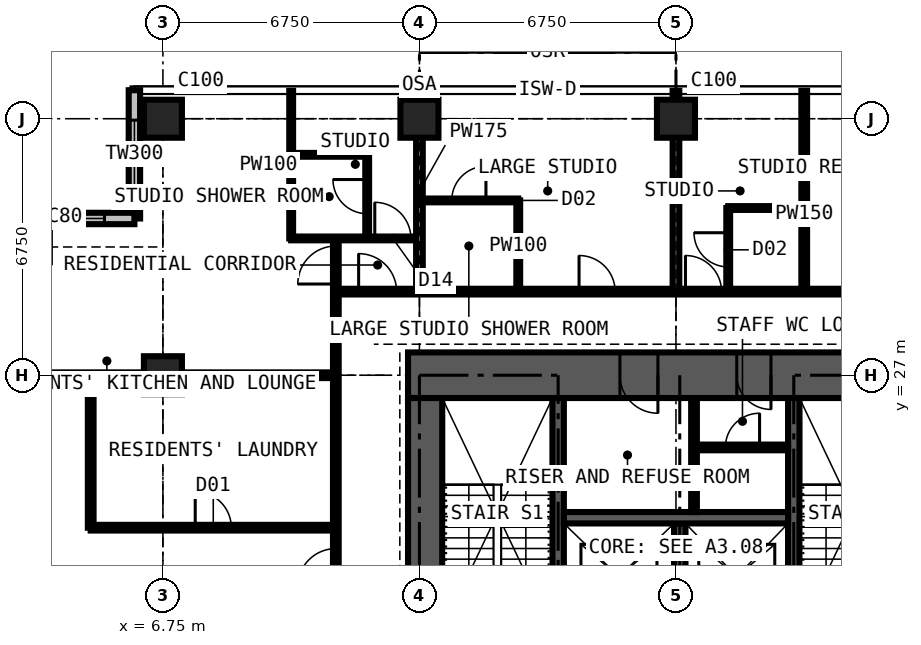
"""IFC4 building model, lengths in metres.
Left out: names, types, materials, properties, quantities, classifications, styles, units other than length and angle.
Written with IfcOpenShell. Run it as: python <this file> out.ifc"""

import sys

from ifc_helpers import new_model, si_unit, direction, frame, frame_2d, origin, origin_2d, place, context, subcontext, project, spatial, rectangle, extrude, element, fill, save


model = new_model("IFC4")
c1 = context("Model", 3, precision=1e-05, world=origin(), true_north=direction((0.0, 1.0)))
c2 = subcontext(c1, "Body", "Model", "MODEL_VIEW")
j1 = project(units=[si_unit("LENGTHUNIT", "METRE"), si_unit("PLANEANGLEUNIT", "RADIAN")], contexts=[c1])
p1 = place(None, origin())
s1 = spatial("IfcSite", under=j1, at=p1, CompositionType="ELEMENT")
p2 = place(p1, origin())
s2 = spatial("IfcBuilding", under=s1, at=p2, CompositionType="ELEMENT")
p3 = place(p2, frame((0.0, 0.0, 243.9)))
s3 = spatial("IfcBuildingStorey", under=s2, at=p3, CompositionType="ELEMENT", Elevation=243.9)
for number, where, z_axis, x_axis in (
    (1, (6.75, 27.0, 0.0), (0.0, 0.0, 1.0), (1.0, 0.0, 0.0)),
    (2, (6.75, 33.75, 0.0), (0.0, 0.0, 1.0), (1.0, 0.0, 0.0)),
    (3, (13.5, 33.75, 0.0), (0.0, 0.0, 1.0), (1.0, 0.0, 0.0)),
    (4, (20.25, 33.75, 0.0), (0.0, 0.0, 1.0), (1.0, 0.0, 0.0)),
):
    element("IfcColumn", number, at=place(p3, frame(where, z_axis=z_axis, x_axis=x_axis)), inside=s3, PredefinedType="COLUMN", context=c2, shape_type="SweptSolid", body=[
        extrude(rectangle(XDim=1.0, YDim=1.0, at=origin_2d()), origin(), (0.0, 0.0, 1.0), 3.6),
    ])
p4 = place(p3, frame((27.3, 27.0, 0.0), z_axis=(0.0, 0.0, 1.0), x_axis=(-1.0, 0.0, 0.0)))
e5 = element("IfcWall", 5, at=p4, inside=s3, PredefinedType="SHEAR", context=c2, shape_type="SweptSolid", body=[
    extrude(rectangle(XDim=14.1, YDim=1.2, at=frame_2d((7.05, 0.0))), origin(), (0.0, 0.0, 1.0), 3.6),
])
p5 = place(p4, frame((4.55, 0.0, 0.0)))
e6 = element("IfcOpeningElement", 6, at=p5, cuts=e5, PredefinedType="OPENING", context=c2, shape_type="SweptSolid", body=[
    extrude(rectangle(XDim=0.9, YDim=2.2, at=frame_2d((0.45, 1.1))), frame((0.0, 0.61, 0.0), z_axis=(0.0, -1.0, 0.0), x_axis=(1.0, 0.0, 0.0)), (0.0, 0.0, 1.0), 1.22),
])
p6 = place(p4, frame((7.525, 0.0, 0.0)))
e7 = element("IfcOpeningElement", 7, at=p6, cuts=e5, PredefinedType="OPENING", context=c2, shape_type="SweptSolid", body=[
    extrude(rectangle(XDim=1.0, YDim=2.2, at=frame_2d((0.5, 1.1))), frame((0.0, 0.61, 0.0), z_axis=(0.0, -1.0, 0.0), x_axis=(1.0, 0.0, 0.0)), (0.0, 0.0, 1.0), 1.22),
])
p7 = place(p3, frame((13.65, 26.4, 0.0), z_axis=(0.0, 0.0, 1.0), x_axis=(0.0, -1.0, 0.0)))
e8 = element("IfcWall", 8, at=p7, inside=s3, PredefinedType="SHEAR", context=c2, shape_type="SweptSolid", body=[
    extrude(rectangle(XDim=12.3, YDim=0.9, at=frame_2d((6.15, 0.0))), origin(), (0.0, 0.0, 1.0), 3.6),
])
p8 = place(p7, frame((7.45, 0.0, 0.0)))
e9 = element("IfcOpeningElement", 9, at=p8, cuts=e8, PredefinedType="OPENING", context=c2, shape_type="SweptSolid", body=[
    extrude(rectangle(XDim=1.2, YDim=2.2, at=frame_2d((0.6, 1.1))), frame((0.0, 0.46, 0.0), z_axis=(0.0, -1.0, 0.0), x_axis=(1.0, 0.0, 0.0)), (0.0, 0.0, 1.0), 0.92),
])
p9 = place(p3, frame((6.0, 34.5, 0.0), z_axis=(0.0, 0.0, 1.0), x_axis=(0.0, -1.0, 0.0)))
e10 = element("IfcWall", 10, at=p9, inside=s3, PredefinedType="SOLIDWALL", context=c2, shape_type="SweptSolid", body=[
    extrude(rectangle(XDim=3.375, YDim=0.3, at=frame_2d((1.688, 0.0))), origin(), (0.0, 0.0, 1.0), 3.375),
])
p10 = place(p9, frame((0.788, 0.0, 0.6)))
e11 = element("IfcOpeningElement", 11, at=p10, cuts=e10, PredefinedType="OPENING", context=c2, shape_type="SweptSolid", body=[
    extrude(rectangle(XDim=1.8, YDim=2.1, at=frame_2d((0.9, 1.05))), frame((0.0, 0.16, 0.0), z_axis=(0.0, -1.0, 0.0), x_axis=(1.0, 0.0, 0.0)), (0.0, 0.0, 1.0), 0.32),
])
p11 = place(p3, frame((6.0, 31.125, 0.0), z_axis=(0.0, 0.0, 1.0), x_axis=(-1.0, 0.0, 0.0)))
e12 = element("IfcWall", 12, at=p11, inside=s3, PredefinedType="SOLIDWALL", context=c2, shape_type="SweptSolid", body=[
    extrude(rectangle(XDim=3.375, YDim=0.3, at=frame_2d((1.688, 0.0))), origin(), (0.0, 0.0, 1.0), 3.375),
])
p12 = place(p11, frame((0.788, 0.0, 0.6)))
e13 = element("IfcOpeningElement", 13, at=p12, cuts=e12, PredefinedType="OPENING", context=c2, shape_type="SweptSolid", body=[
    extrude(rectangle(XDim=1.8, YDim=2.1, at=frame_2d((0.9, 1.05))), frame((0.0, 0.16, 0.0), z_axis=(0.0, -1.0, 0.0), x_axis=(1.0, 0.0, 0.0)), (0.0, 0.0, 1.0), 0.32),
])
for number, where, z_axis, x_axis in (
    (14, (17.15, 20.3, 0.0), (0.0, 0.0, 1.0), (0.0, 1.0, 0.0)),
    (15, (23.35, 20.3, 0.0), (0.0, 0.0, 1.0), (0.0, 1.0, 0.0)),
):
    element("IfcWall", number, at=place(p3, frame(where, z_axis=z_axis, x_axis=x_axis)), inside=s3, PredefinedType="SHEAR", context=c2, shape_type="SweptSolid", body=[
        extrude(rectangle(XDim=6.1, YDim=0.3, at=frame_2d((3.05, 0.0))), origin(), (0.0, 0.0, 1.0), 3.6),
    ])
p13 = place(p3, frame((20.35, 20.3, 0.0), z_axis=(0.0, 0.0, 1.0), x_axis=(0.0, 1.0, 0.0)))
e16 = element("IfcWall", 16, at=p13, inside=s3, PredefinedType="SHEAR", context=c2, shape_type="SweptSolid", body=[
    extrude(rectangle(XDim=2.8, YDim=0.3, at=frame_2d((1.4, 0.0))), origin(), (0.0, 0.0, 1.0), 3.6),
])
p14 = place(p3, frame((17.3, 23.25, 0.0), z_axis=(0.0, 0.0, 1.0), x_axis=(1.0, 0.0, 0.0)))
e17 = element("IfcWall", 17, at=p14, inside=s3, PredefinedType="SHEAR", context=c2, shape_type="SweptSolid", body=[
    extrude(rectangle(XDim=5.9, YDim=0.3, at=frame_2d((2.95, 0.0))), origin(), (0.0, 0.0, 1.0), 3.6),
])
p15 = place(p3, frame((20.725, 23.4, 0.0), z_axis=(0.0, 0.0, 1.0), x_axis=(0.0, 1.0, 0.0)))
e18 = element("IfcWall", 18, at=p15, inside=s3, PredefinedType="PARTITIONING", context=c2, shape_type="SweptSolid", body=[
    extrude(rectangle(XDim=3.0, YDim=0.15, at=frame_2d((1.5, 0.0))), origin(), (0.0, 0.0, 1.0), 3.375),
])
p16 = place(p3, frame((20.8, 25.1, 0.0), z_axis=(0.0, 0.0, 1.0), x_axis=(1.0, 0.0, 0.0)))
e19 = element("IfcWall", 19, at=p16, inside=s3, PredefinedType="PARTITIONING", context=c2, shape_type="SweptSolid", body=[
    extrude(rectangle(XDim=2.4, YDim=0.15, at=frame_2d((1.2, 0.0))), origin(), (0.0, 0.0, 1.0), 3.375),
])
p17 = place(p16, frame((0.75, 0.0, 0.0)))
e20 = element("IfcOpeningElement", 20, at=p17, cuts=e19, PredefinedType="OPENING", context=c2, shape_type="SweptSolid", body=[
    extrude(rectangle(XDim=0.9, YDim=2.2, at=frame_2d((0.45, 1.1))), frame((0.0, 0.085, 0.0), z_axis=(0.0, -1.0, 0.0), x_axis=(1.0, 0.0, 0.0)), (0.0, 0.0, 1.0), 0.17),
])
p18 = place(p3, frame((3.35, 27.0, 0.0), z_axis=(0.0, 0.0, 1.0), x_axis=(1.0, 0.0, 0.0)))
e21 = element("IfcWall", 21, at=p18, inside=s3, PredefinedType="PARTITIONING", context=c2, shape_type="SweptSolid", body=[
    extrude(rectangle(XDim=7.95, YDim=0.15, at=frame_2d((3.975, 0.0))), origin(), (0.0, 0.0, 1.0), 2.877),
])
p19 = place(p3, frame((4.85, 22.988, 0.0), z_axis=(0.0, 0.0, 1.0), x_axis=(0.0, 1.0, 0.0)))
e22 = element("IfcWall", 22, at=p19, inside=s3, PredefinedType="PARTITIONING", context=c2, shape_type="SweptSolid", body=[
    extrude(rectangle(XDim=4.012, YDim=0.15, at=frame_2d((2.006, 0.0))), origin(), (0.0, 0.0, 1.0), 3.375),
])
p20 = place(p3, frame((4.85, 22.988, 0.0), z_axis=(0.0, 0.0, 1.0), x_axis=(1.0, 0.0, 0.0)))
e23 = element("IfcWall", 23, at=p20, inside=s3, PredefinedType="PARTITIONING", context=c2, shape_type="SweptSolid", body=[
    extrude(rectangle(XDim=6.45, YDim=0.15, at=frame_2d((3.225, 0.0))), origin(), (0.0, 0.0, 1.0), 3.375),
])
p21 = place(p20, frame((2.75, 0.0, 0.0)))
e24 = element("IfcOpeningElement", 24, at=p21, cuts=e23, PredefinedType="OPENING", context=c2, shape_type="SweptSolid", body=[
    extrude(rectangle(XDim=0.95, YDim=2.2, at=frame_2d((0.475, 1.1))), frame((0.0, 0.085, 0.0), z_axis=(0.0, -1.0, 0.0), x_axis=(1.0, 0.0, 0.0)), (0.0, 0.0, 1.0), 0.17),
])
p22 = place(p3, frame((10.125, 30.6, 0.0), z_axis=(0.0, 0.0, 1.0), x_axis=(0.0, 1.0, 0.0)))
e25 = element("IfcWall", 25, at=p22, inside=s3, PredefinedType="PARTITIONING", context=c2, shape_type="SweptSolid", body=[
    extrude(rectangle(XDim=3.884, YDim=0.1, at=frame_2d((1.942, 0.0))), origin(), (0.0, 0.0, 1.0), 3.375),
])
p23 = place(p3, frame((10.125, 30.6, 0.0), z_axis=(0.0, 0.0, 1.0), x_axis=(1.0, 0.0, 0.0)))
e26 = element("IfcWall", 26, at=p23, inside=s3, PredefinedType="PARTITIONING", context=c2, shape_type="SweptSolid", body=[
    extrude(rectangle(XDim=3.375, YDim=0.1, at=frame_2d((1.688, 0.0))), origin(), (0.0, 0.0, 1.0), 3.375),
])
p24 = place(p23, frame((2.2, 0.0, 0.0)))
e27 = element("IfcOpeningElement", 27, at=p24, cuts=e26, PredefinedType="OPENING", context=c2, shape_type="SweptSolid", body=[
    extrude(rectangle(XDim=0.95, YDim=2.2, at=frame_2d((0.475, 1.1))), frame((0.0, 0.06, 0.0), z_axis=(0.0, -1.0, 0.0), x_axis=(1.0, 0.0, 0.0)), (0.0, 0.0, 1.0), 0.12),
])
p25 = place(p3, frame((10.125, 32.8, 0.0), z_axis=(0.0, 0.0, 1.0), x_axis=(1.0, 0.0, 0.0)))
e28 = element("IfcWall", 28, at=p25, inside=s3, PredefinedType="PARTITIONING", context=c2, shape_type="SweptSolid", body=[
    extrude(rectangle(XDim=2.0, YDim=0.1, at=frame_2d((1.0, 0.0))), origin(), (0.0, 0.0, 1.0), 3.375),
])
p26 = place(p3, frame((11.3, 11.3, 0.0), z_axis=(0.0, 0.0, 1.0), x_axis=(0.0, 1.0, 0.0)))
e29 = element("IfcWall", 29, at=p26, inside=s3, PredefinedType="PARTITIONING", context=c2, shape_type="SweptSolid", body=[
    extrude(rectangle(XDim=19.3, YDim=0.15, at=frame_2d((9.65, 0.0))), origin(), (0.0, 0.0, 1.0), 3.375),
])
p27 = place(p26, frame((18.1, 0.0, 0.0)))
e30 = element("IfcOpeningElement", 30, at=p27, cuts=e29, PredefinedType="OPENING", context=c2, shape_type="SweptSolid", body=[
    extrude(rectangle(XDim=1.0, YDim=2.2, at=frame_2d((0.5, 1.1))), frame((0.0, 0.085, 0.0), z_axis=(0.0, -1.0, 0.0), x_axis=(1.0, 0.0, 0.0)), (0.0, 0.0, 1.0), 0.17),
])
p28 = place(p26, frame((10.137, 0.0, 0.0)))
e31 = element("IfcOpeningElement", 31, at=p28, cuts=e29, PredefinedType="OPENING", context=c2, shape_type="SweptSolid", body=[
    extrude(rectangle(XDim=1.0, YDim=2.2, at=frame_2d((0.5, 1.1))), frame((0.0, 0.085, 0.0), z_axis=(0.0, -1.0, 0.0), x_axis=(1.0, 0.0, 0.0)), (0.0, 0.0, 1.0), 0.17),
])
p29 = place(p3, frame((11.3, 29.2, 0.0), z_axis=(0.0, 0.0, 1.0), x_axis=(1.0, 0.0, 0.0)))
e32 = element("IfcWall", 32, at=p29, inside=s3, PredefinedType="PARTITIONING", context=c2, shape_type="SweptSolid", body=[
    extrude(rectangle(XDim=19.809, YDim=0.15, at=frame_2d((9.904, 0.0))), origin(), (0.0, 0.0, 1.0), 3.375),
])
p30 = place(p29, frame((14.625, 0.0, 0.0)))
e33 = element("IfcOpeningElement", 33, at=p30, cuts=e32, PredefinedType="OPENING", context=c2, shape_type="SweptSolid", body=[
    extrude(rectangle(XDim=1.0, YDim=2.2, at=frame_2d((0.5, 1.1))), frame((0.0, 0.085, 0.0), z_axis=(0.0, -1.0, 0.0), x_axis=(1.0, 0.0, 0.0)), (0.0, 0.0, 1.0), 0.17),
])
p31 = place(p29, frame((6.4, 0.0, 0.0)))
e34 = element("IfcOpeningElement", 34, at=p31, cuts=e32, PredefinedType="OPENING", context=c2, shape_type="SweptSolid", body=[
    extrude(rectangle(XDim=0.95, YDim=2.2, at=frame_2d((0.475, 1.1))), frame((0.0, 0.085, 0.0), z_axis=(0.0, -1.0, 0.0), x_axis=(1.0, 0.0, 0.0)), (0.0, 0.0, 1.0), 0.17),
])
p32 = place(p29, frame((9.2, 0.0, 0.0)))
e35 = element("IfcOpeningElement", 35, at=p32, cuts=e32, PredefinedType="OPENING", context=c2, shape_type="SweptSolid", body=[
    extrude(rectangle(XDim=0.95, YDim=2.2, at=frame_2d((0.475, 1.1))), frame((0.0, 0.085, 0.0), z_axis=(0.0, -1.0, 0.0), x_axis=(1.0, 0.0, 0.0)), (0.0, 0.0, 1.0), 0.17),
])
p33 = place(p29, frame((0.6, 0.0, 0.0)))
e36 = element("IfcOpeningElement", 36, at=p33, cuts=e32, PredefinedType="OPENING", context=c2, shape_type="SweptSolid", body=[
    extrude(rectangle(XDim=1.0, YDim=2.2, at=frame_2d((0.5, 1.1))), frame((0.0, 0.085, 0.0), z_axis=(0.0, -1.0, 0.0), x_axis=(1.0, 0.0, 0.0)), (0.0, 0.0, 1.0), 0.17),
])
p34 = place(p3, frame((12.125, 30.6, 0.0), z_axis=(0.0, 0.0, 1.0), x_axis=(0.0, 1.0, 0.0)))
e37 = element("IfcWall", 37, at=p34, inside=s3, PredefinedType="PARTITIONING", context=c2, shape_type="SweptSolid", body=[
    extrude(rectangle(XDim=2.2, YDim=0.1, at=frame_2d((1.1, 0.0))), origin(), (0.0, 0.0, 1.0), 3.375),
])
p35 = place(p34, frame((0.65, 0.0, 0.0)))
e38 = element("IfcOpeningElement", 38, at=p35, cuts=e37, PredefinedType="OPENING", context=c2, shape_type="SweptSolid", body=[
    extrude(rectangle(XDim=0.9, YDim=2.2, at=frame_2d((0.45, 1.1))), frame((0.0, 0.06, 0.0), z_axis=(0.0, -1.0, 0.0), x_axis=(1.0, 0.0, 0.0)), (0.0, 0.0, 1.0), 0.12),
])
p36 = place(p3, frame((13.5, 29.2, 0.0), z_axis=(0.0, 0.0, 1.0), x_axis=(0.0, 1.0, 0.0)))
e39 = element("IfcWall", 39, at=p36, inside=s3, PredefinedType="PARTITIONING", context=c2, shape_type="SweptSolid", body=[
    extrude(rectangle(XDim=5.284, YDim=0.175, at=frame_2d((2.642, 0.0))), origin(), (0.0, 0.0, 1.0), 2.61),
])
p37 = place(p3, frame((13.5, 31.6, 0.0), z_axis=(0.0, 0.0, 1.0), x_axis=(1.0, 0.0, 0.0)))
e40 = element("IfcWall", 40, at=p37, inside=s3, PredefinedType="PARTITIONING", context=c2, shape_type="SweptSolid", body=[
    extrude(rectangle(XDim=2.6, YDim=0.1, at=frame_2d((1.3, 0.0))), origin(), (0.0, 0.0, 1.0), 3.375),
])
p38 = place(p37, frame((0.85, 0.0, 0.0)))
e41 = element("IfcOpeningElement", 41, at=p38, cuts=e40, PredefinedType="OPENING", context=c2, shape_type="SweptSolid", body=[
    extrude(rectangle(XDim=0.9, YDim=2.2, at=frame_2d((0.45, 1.1))), frame((0.0, 0.06, 0.0), z_axis=(0.0, -1.0, 0.0), x_axis=(1.0, 0.0, 0.0)), (0.0, 0.0, 1.0), 0.12),
])
p39 = place(p3, frame((16.1, 29.2, 0.0), z_axis=(0.0, 0.0, 1.0), x_axis=(0.0, 1.0, 0.0)))
e42 = element("IfcWall", 42, at=p39, inside=s3, PredefinedType="PARTITIONING", context=c2, shape_type="SweptSolid", body=[
    extrude(rectangle(XDim=2.4, YDim=0.1, at=frame_2d((1.2, 0.0))), origin(), (0.0, 0.0, 1.0), 3.375),
])
p40 = place(p3, frame((20.25, 29.2, 0.0), z_axis=(0.0, 0.0, 1.0), x_axis=(0.0, 1.0, 0.0)))
e43 = element("IfcWall", 43, at=p40, inside=s3, PredefinedType="PARTITIONING", context=c2, shape_type="SweptSolid", body=[
    extrude(rectangle(XDim=5.284, YDim=0.175, at=frame_2d((2.642, 0.0))), origin(), (0.0, 0.0, 1.0), 2.61),
])
p41 = place(p3, frame((21.625, 29.2, 0.0), z_axis=(0.0, 0.0, 1.0), x_axis=(0.0, 1.0, 0.0)))
e44 = element("IfcWall", 44, at=p41, inside=s3, PredefinedType="PARTITIONING", context=c2, shape_type="SweptSolid", body=[
    extrude(rectangle(XDim=2.2, YDim=0.1, at=frame_2d((1.1, 0.0))), origin(), (0.0, 0.0, 1.0), 3.375),
])
p42 = place(p41, frame((0.65, 0.0, 0.0)))
e45 = element("IfcOpeningElement", 45, at=p42, cuts=e44, PredefinedType="OPENING", context=c2, shape_type="SweptSolid", body=[
    extrude(rectangle(XDim=0.9, YDim=2.2, at=frame_2d((0.45, 1.1))), frame((0.0, 0.06, 0.0), z_axis=(0.0, -1.0, 0.0), x_axis=(1.0, 0.0, 0.0)), (0.0, 0.0, 1.0), 0.12),
])
p43 = place(p3, frame((21.625, 31.4, 0.0), z_axis=(0.0, 0.0, 1.0), x_axis=(1.0, 0.0, 0.0)))
e46 = element("IfcWall", 46, at=p43, inside=s3, PredefinedType="PARTITIONING", context=c2, shape_type="SweptSolid", body=[
    extrude(rectangle(XDim=2.0, YDim=0.1, at=frame_2d((1.0, 0.0))), origin(), (0.0, 0.0, 1.0), 3.375),
])
p44 = place(p3, frame((23.625, 29.2, 0.0), z_axis=(0.0, 0.0, 1.0), x_axis=(0.0, 1.0, 0.0)))
e47 = element("IfcWall", 47, at=p44, inside=s3, PredefinedType="PARTITIONING", context=c2, shape_type="SweptSolid", body=[
    extrude(rectangle(XDim=5.284, YDim=0.15, at=frame_2d((2.642, 0.0))), origin(), (0.0, 0.0, 1.0), 3.375),
])
p45 = place(p10, origin())
e48 = element("IfcWindow", 48, at=p45, inside=s3, PartitioningType="SINGLE_PANEL", PredefinedType="WINDOW", context=c2, shape_type="SweptSolid", body=[
    extrude(rectangle(XDim=1.8, YDim=2.1, at=frame_2d((0.9, 1.05))), frame((0.0, 0.03, 0.0), z_axis=(0.0, -1.0, 0.0), x_axis=(1.0, 0.0, 0.0)), (0.0, 0.0, 1.0), 0.06),
])
fill(e11, e48)
p46 = place(p12, origin())
e49 = element("IfcWindow", 49, at=p46, inside=s3, PartitioningType="SINGLE_PANEL", PredefinedType="WINDOW", context=c2, shape_type="SweptSolid", body=[
    extrude(rectangle(XDim=1.8, YDim=2.1, at=frame_2d((0.9, 1.05))), frame((0.0, 0.03, 0.0), z_axis=(0.0, -1.0, 0.0), x_axis=(1.0, 0.0, 0.0)), (0.0, 0.0, 1.0), 0.06),
])
fill(e13, e49)
p47 = place(p17, origin())
e50 = element("IfcDoor", 50, at=p47, inside=s3, OperationType="SINGLE_SWING_RIGHT", PredefinedType="DOOR", context=c2, shape_type="SweptSolid", body=[
    extrude(rectangle(XDim=0.9, YDim=2.2, at=frame_2d((0.45, 1.1))), frame((0.0, 0.025, 0.0), z_axis=(0.0, -1.0, 0.0), x_axis=(1.0, 0.0, 0.0)), (0.0, 0.0, 1.0), 0.05),
])
fill(e20, e50)
p48 = place(p5, origin())
e51 = element("IfcDoor", 51, at=p48, inside=s3, OperationType="SINGLE_SWING_LEFT", PredefinedType="DOOR", context=c2, shape_type="SweptSolid", body=[
    extrude(rectangle(XDim=0.9, YDim=2.2, at=frame_2d((0.45, 1.1))), frame((0.0, 0.4, 0.0), z_axis=(0.0, -1.0, 0.0), x_axis=(1.0, 0.0, 0.0)), (0.0, 0.0, 1.0), 0.8),
])
fill(e6, e51)
p49 = place(p6, origin())
e52 = element("IfcDoor", 52, at=p49, inside=s3, OperationType="SINGLE_SWING_LEFT", PredefinedType="DOOR", context=c2, shape_type="SweptSolid", body=[
    extrude(rectangle(XDim=1.0, YDim=2.2, at=frame_2d((0.5, 1.1))), frame((0.0, 0.025, 0.0), z_axis=(0.0, -1.0, 0.0), x_axis=(1.0, 0.0, 0.0)), (0.0, 0.0, 1.0), 0.05),
])
fill(e7, e52)
p50 = place(p31, origin())
e53 = element("IfcDoor", 53, at=p50, inside=s3, OperationType="SINGLE_SWING_LEFT", PredefinedType="DOOR", context=c2, shape_type="SweptSolid", body=[
    extrude(rectangle(XDim=0.95, YDim=2.2, at=frame_2d((0.475, 1.1))), frame((0.0, 0.025, 0.0), z_axis=(0.0, -1.0, 0.0), x_axis=(1.0, 0.0, 0.0)), (0.0, 0.0, 1.0), 0.05),
])
fill(e34, e53)
p51 = place(p38, origin())
e54 = element("IfcDoor", 54, at=p51, inside=s3, OperationType="SINGLE_SWING_RIGHT", PredefinedType="DOOR", context=c2, shape_type="SweptSolid", body=[
    extrude(rectangle(XDim=0.9, YDim=2.2, at=frame_2d((0.45, 1.1))), frame((0.0, 0.025, 0.0), z_axis=(0.0, -1.0, 0.0), x_axis=(1.0, 0.0, 0.0)), (0.0, 0.0, 1.0), 0.05),
])
fill(e41, e54)
p52 = place(p24, origin())
e55 = element("IfcDoor", 55, at=p52, inside=s3, OperationType="SINGLE_SWING_LEFT", PredefinedType="DOOR", context=c2, shape_type="SweptSolid", body=[
    extrude(rectangle(XDim=0.95, YDim=2.2, at=frame_2d((0.475, 1.1))), frame((0.0, 0.025, 0.0), z_axis=(0.0, -1.0, 0.0), x_axis=(1.0, 0.0, 0.0)), (0.0, 0.0, 1.0), 0.05),
])
fill(e27, e55)
p53 = place(p35, origin())
e56 = element("IfcDoor", 56, at=p53, inside=s3, OperationType="SINGLE_SWING_RIGHT", PredefinedType="DOOR", context=c2, shape_type="SweptSolid", body=[
    extrude(rectangle(XDim=0.9, YDim=2.2, at=frame_2d((0.45, 1.1))), frame((0.0, 0.025, 0.0), z_axis=(0.0, -1.0, 0.0), x_axis=(1.0, 0.0, 0.0)), (0.0, 0.0, 1.0), 0.05),
])
fill(e38, e56)
p54 = place(p32, origin())
e57 = element("IfcDoor", 57, at=p54, inside=s3, OperationType="SINGLE_SWING_LEFT", PredefinedType="DOOR", context=c2, shape_type="SweptSolid", body=[
    extrude(rectangle(XDim=0.95, YDim=2.2, at=frame_2d((0.475, 1.1))), frame((0.0, 0.025, 0.0), z_axis=(0.0, -1.0, 0.0), x_axis=(1.0, 0.0, 0.0)), (0.0, 0.0, 1.0), 0.05),
])
fill(e35, e57)
p55 = place(p42, origin())
e58 = element("IfcDoor", 58, at=p55, inside=s3, OperationType="SINGLE_SWING_RIGHT", PredefinedType="DOOR", context=c2, shape_type="SweptSolid", body=[
    extrude(rectangle(XDim=0.9, YDim=2.2, at=frame_2d((0.45, 1.1))), frame((0.0, 0.025, 0.0), z_axis=(0.0, -1.0, 0.0), x_axis=(1.0, 0.0, 0.0)), (0.0, 0.0, 1.0), 0.05),
])
fill(e45, e58)
p56 = place(p33, origin())
e59 = element("IfcDoor", 59, at=p56, inside=s3, OperationType="SINGLE_SWING_LEFT", PredefinedType="DOOR", context=c2, shape_type="SweptSolid", body=[
    extrude(rectangle(XDim=1.0, YDim=2.2, at=frame_2d((0.5, 1.1))), frame((0.0, 0.025, 0.0), z_axis=(0.0, -1.0, 0.0), x_axis=(1.0, 0.0, 0.0)), (0.0, 0.0, 1.0), 0.05),
])
fill(e36, e59)
p57 = place(p27, origin())
e60 = element("IfcDoor", 60, at=p57, inside=s3, OperationType="SINGLE_SWING_LEFT", PredefinedType="DOOR", context=c2, shape_type="SweptSolid", body=[
    extrude(rectangle(XDim=1.0, YDim=2.2, at=frame_2d((0.5, 1.1))), frame((0.0, 0.025, 0.0), z_axis=(0.0, -1.0, 0.0), x_axis=(1.0, 0.0, 0.0)), (0.0, 0.0, 1.0), 0.05),
])
fill(e30, e60)
p58 = place(p28, origin())
e61 = element("IfcDoor", 61, at=p58, inside=s3, OperationType="SINGLE_SWING_LEFT", PredefinedType="DOOR", context=c2, shape_type="SweptSolid", body=[
    extrude(rectangle(XDim=1.0, YDim=2.2, at=frame_2d((0.5, 1.1))), frame((0.0, 0.025, 0.0), z_axis=(0.0, -1.0, 0.0), x_axis=(1.0, 0.0, 0.0)), (0.0, 0.0, 1.0), 0.05),
])
fill(e31, e61)
p59 = place(p21, origin())
e62 = element("IfcDoor", 62, at=p59, inside=s3, OperationType="SINGLE_SWING_LEFT", PredefinedType="DOOR", context=c2, shape_type="SweptSolid", body=[
    extrude(rectangle(XDim=0.95, YDim=2.2, at=frame_2d((0.475, 1.1))), frame((0.0, 0.025, 0.0), z_axis=(0.0, -1.0, 0.0), x_axis=(1.0, 0.0, 0.0)), (0.0, 0.0, 1.0), 0.05),
])
fill(e24, e62)
save(model, sys.argv[1])
